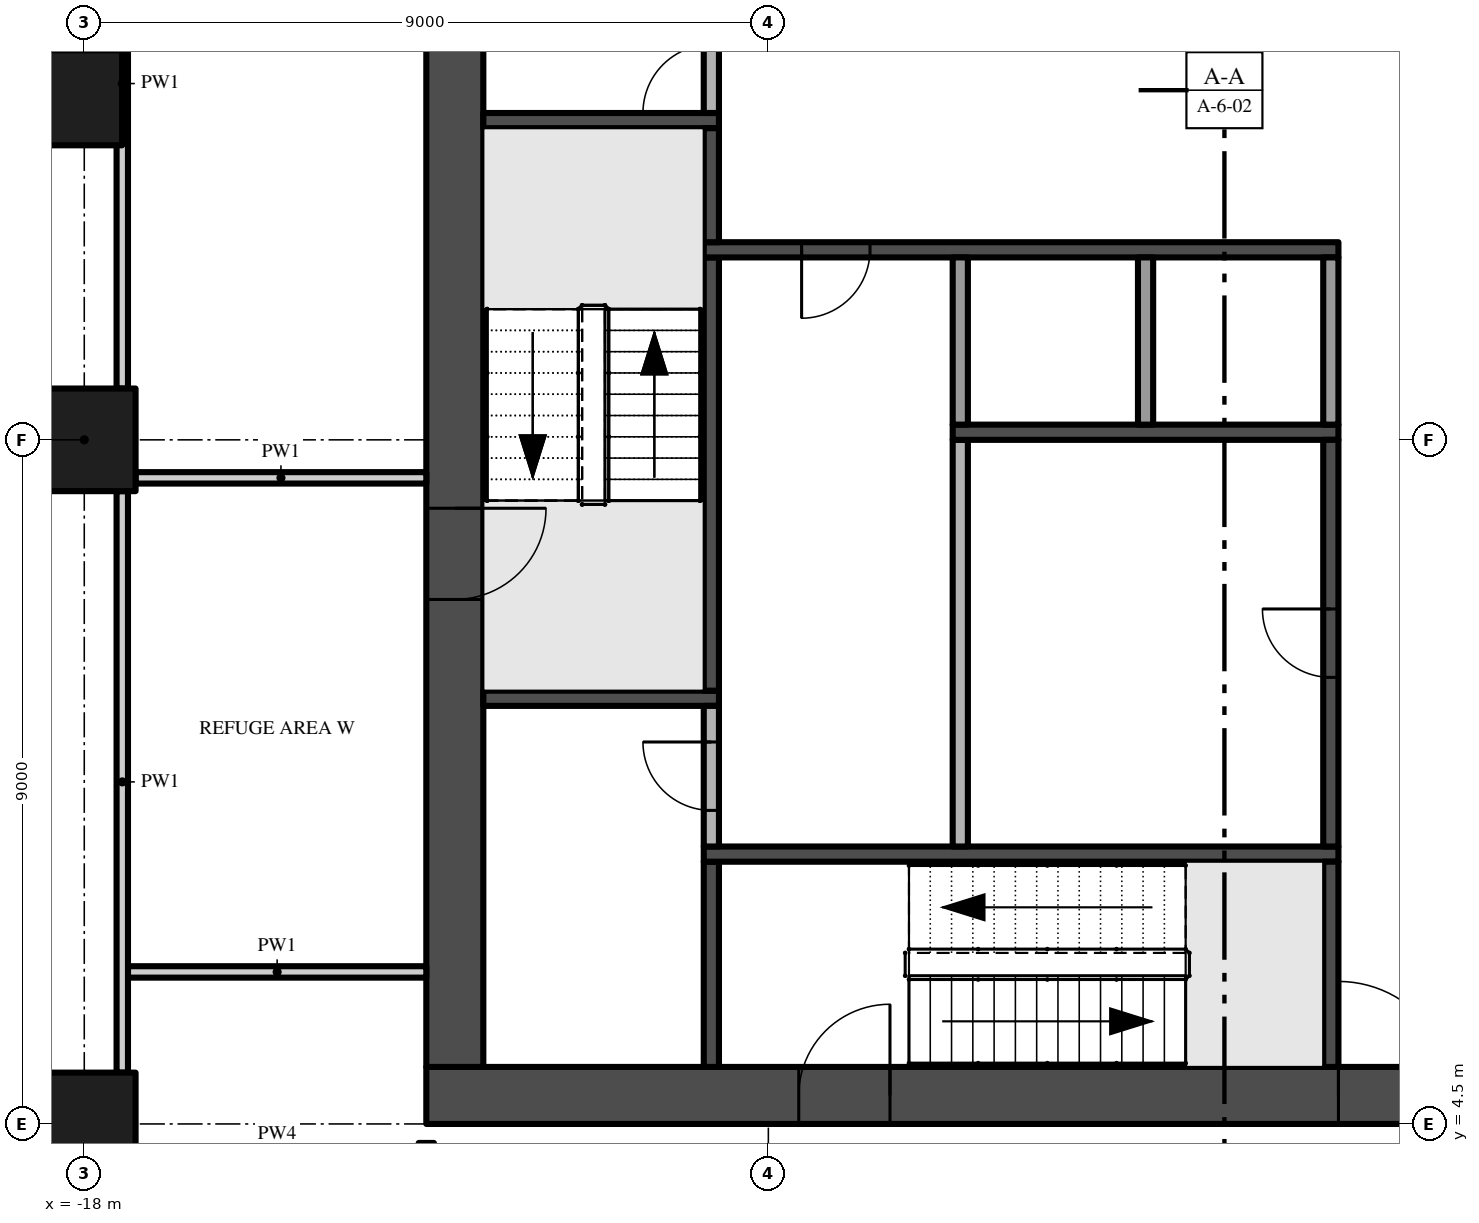
"""IFC4 building model, lengths in metres.
Left out: names, types, materials, properties, quantities, classifications, styles, units other than length and angle.
Written with IfcOpenShell. Run it as: python <this file> out.ifc"""

import sys

from ifc_helpers import new_model, si_unit, direction, frame, frame_2d, origin, origin_2d, place, context, subcontext, project, spatial, rectangle, extrude, element, fill, save


model = new_model("IFC4")
c1 = context("Model", 3, precision=1e-05, world=origin(), true_north=direction((0.0, 1.0)))
c2 = subcontext(c1, "Body", "Model", "MODEL_VIEW")
j1 = project(units=[si_unit("LENGTHUNIT", "METRE"), si_unit("PLANEANGLEUNIT", "RADIAN")], contexts=[c1])
p1 = place(None, origin())
s1 = spatial("IfcSite", under=j1, at=p1, CompositionType="ELEMENT")
p2 = place(p1, origin())
s2 = spatial("IfcBuilding", under=s1, at=p2, CompositionType="ELEMENT")
p3 = place(p2, frame((0.0, 0.0, 115.0)))
s3 = spatial("IfcBuildingStorey", under=s2, at=p3, CompositionType="ELEMENT", Elevation=115.0)
p4 = place(p3, frame((-13.5, 4.875, -0.3), z_axis=(0.0, 0.0, 1.0), x_axis=(1.0, 0.0, 0.0)))
e1 = element("IfcWall", 1, at=p4, inside=s3, PredefinedType="SHEAR", context=c2, shape_type="SweptSolid", body=[
    extrude(rectangle(XDim=27.0, YDim=0.75, at=frame_2d((13.5, 0.0))), origin(), (0.0, 0.0, 1.0), 5.0),
])
p5 = place(p4, frame((12.0, 0.0, 0.3)))
e2 = element("IfcOpeningElement", 2, at=p5, cuts=e1, PredefinedType="OPENING", context=c2, shape_type="SweptSolid", body=[
    extrude(rectangle(XDim=3.0, YDim=2.4, at=frame_2d((1.5, 1.2))), frame((0.0, 0.385, 0.0), z_axis=(0.0, -1.0, 0.0), x_axis=(1.0, 0.0, 0.0)), (0.0, 0.0, 1.0), 0.77),
])
p6 = place(p4, frame((4.9, 0.0, 0.3)))
e3 = element("IfcOpeningElement", 3, at=p6, cuts=e1, PredefinedType="OPENING", context=c2, shape_type="SweptSolid", body=[
    extrude(rectangle(XDim=1.2, YDim=2.2, at=frame_2d((0.6, 1.1))), frame((0.0, 0.385, 0.0), z_axis=(0.0, -1.0, 0.0), x_axis=(1.0, 0.0, 0.0)), (0.0, 0.0, 1.0), 0.77),
])
p7 = place(p4, frame((20.75, 0.0, 0.3)))
e4 = element("IfcOpeningElement", 4, at=p7, cuts=e1, PredefinedType="OPENING", context=c2, shape_type="SweptSolid", body=[
    extrude(rectangle(XDim=1.5, YDim=2.2, at=frame_2d((0.75, 1.1))), frame((0.0, 0.385, 0.0), z_axis=(0.0, -1.0, 0.0), x_axis=(1.0, 0.0, 0.0)), (0.0, 0.0, 1.0), 0.77),
])
p8 = place(p4, frame((17.4, 0.0, 0.3)))
e5 = element("IfcOpeningElement", 5, at=p8, cuts=e1, PredefinedType="OPENING", context=c2, shape_type="SweptSolid", body=[
    extrude(rectangle(XDim=1.2, YDim=2.2, at=frame_2d((0.6, 1.1))), frame((0.0, 0.385, 0.0), z_axis=(0.0, -1.0, 0.0), x_axis=(1.0, 0.0, 0.0)), (0.0, 0.0, 1.0), 0.77),
])
p9 = place(p3, frame((-13.125, 21.75, -0.3), z_axis=(0.0, 0.0, 1.0), x_axis=(0.0, -1.0, 0.0)))
e6 = element("IfcWall", 6, at=p9, inside=s3, PredefinedType="SHEAR", context=c2, shape_type="SweptSolid", body=[
    extrude(rectangle(XDim=16.5, YDim=0.75, at=frame_2d((8.25, 0.0))), origin(), (0.0, 0.0, 1.0), 5.0),
])
p10 = place(p9, frame((9.15, 0.0, 0.3)))
e7 = element("IfcOpeningElement", 7, at=p10, cuts=e6, PredefinedType="OPENING", context=c2, shape_type="SweptSolid", body=[
    extrude(rectangle(XDim=1.2, YDim=2.2, at=frame_2d((0.6, 1.1))), frame((0.0, 0.385, 0.0), z_axis=(0.0, -1.0, 0.0), x_axis=(1.0, 0.0, 0.0)), (0.0, 0.0, 1.0), 0.77),
])
for number, where, z_axis, x_axis in (
    (8, (-18.0, 13.5, 0.0), (0.0, 0.0, 1.0), (1.0, 0.0, 0.0)),
    (9, (-18.0, 4.5, 0.0), (0.0, 0.0, 1.0), (1.0, 0.0, 0.0)),
):
    element("IfcColumn", number, at=place(p3, frame(where, z_axis=z_axis, x_axis=x_axis)), inside=s3, PredefinedType="COLUMN", context=c2, shape_type="SweptSolid", body=[
        extrude(rectangle(XDim=1.35, YDim=1.35, at=origin_2d()), origin(), (0.0, 0.0, 1.0), 4.7),
    ])
p11 = place(p3, frame((-22.373, 18.0, 0.132), z_axis=(0.691571517203, 0.0, 0.722307992891), x_axis=(0.0, 1.0, 0.0)))
e10 = element("IfcColumn", 10, at=p11, inside=s3, PredefinedType="COLUMN", context=c2, shape_type="SweptSolid", body=[
    extrude(rectangle(XDim=1.25, YDim=1.25, at=origin_2d()), origin(), (0.0, 0.0, 1.0), 6.141),
])
for number, where, z_axis, x_axis in (
    (11, (-12.75, 10.1, 0.0), (0.0, 0.0, 1.0), (1.0, 0.0, 0.0)),
    (12, (-12.75, 17.7, 0.0), (0.0, 0.0, 1.0), (1.0, 0.0, 0.0)),
):
    element("IfcWall", number, at=place(p3, frame(where, z_axis=z_axis, x_axis=x_axis)), inside=s3, PredefinedType="SHEAR", context=c2, shape_type="SweptSolid", body=[
        extrude(rectangle(XDim=3.1, YDim=0.2, at=frame_2d((1.55, 0.0))), origin(), (0.0, 0.0, 1.0), 4.7),
    ])
p12 = place(p3, frame((-9.75, 5.25, 0.0), z_axis=(0.0, 0.0, 1.0), x_axis=(0.0, 1.0, 0.0)))
e13 = element("IfcWall", 13, at=p12, inside=s3, PredefinedType="SHEAR", context=c2, shape_type="SweptSolid", body=[
    extrude(rectangle(XDim=2.7, YDim=0.2, at=frame_2d((1.35, 0.0))), origin(), (0.0, 0.0, 1.0), 4.7),
])
p13 = place(p3, frame((-9.85, 8.05, 0.0), z_axis=(0.0, 0.0, 1.0), x_axis=(1.0, 0.0, 0.0)))
e14 = element("IfcWall", 14, at=p13, inside=s3, PredefinedType="SHEAR", context=c2, shape_type="SweptSolid", body=[
    extrude(rectangle(XDim=8.35, YDim=0.2, at=frame_2d((4.175, 0.0))), origin(), (0.0, 0.0, 1.0), 4.7),
])
p14 = place(p3, frame((-9.75, 8.15, 0.0), z_axis=(0.0, 0.0, 1.0), x_axis=(0.0, 1.0, 0.0)))
e15 = element("IfcWall", 15, at=p14, inside=s3, PredefinedType="PARTITIONING", context=c2, shape_type="SweptSolid", body=[
    extrude(rectangle(XDim=1.85, YDim=0.2, at=frame_2d((0.925, 0.0))), origin(), (0.0, 0.0, 1.0), 4.7),
])
p15 = place(p14, frame((0.475, 0.0, 0.0)))
e16 = element("IfcOpeningElement", 16, at=p15, cuts=e15, PredefinedType="OPENING", context=c2, shape_type="SweptSolid", body=[
    extrude(rectangle(XDim=0.9, YDim=2.1, at=frame_2d((0.45, 1.05))), frame((0.0, 0.11, 0.0), z_axis=(0.0, -1.0, 0.0), x_axis=(1.0, 0.0, 0.0)), (0.0, 0.0, 1.0), 0.22),
])
p16 = place(p3, frame((-9.75, 10.2, 0.0), z_axis=(0.0, 0.0, 1.0), x_axis=(0.0, 1.0, 0.0)))
e17 = element("IfcWall", 17, at=p16, inside=s3, PredefinedType="SHEAR", context=c2, shape_type="SweptSolid", body=[
    extrude(rectangle(XDim=5.7, YDim=0.2, at=frame_2d((2.85, 0.0))), origin(), (0.0, 0.0, 1.0), 4.7),
])
p17 = place(p3, frame((-1.5, 16.0, 0.0), z_axis=(0.0, 0.0, 1.0), x_axis=(-1.0, 0.0, 0.0)))
e18 = element("IfcWall", 18, at=p17, inside=s3, PredefinedType="SHEAR", context=c2, shape_type="SweptSolid", body=[
    extrude(rectangle(XDim=8.35, YDim=0.2, at=frame_2d((4.175, 0.0))), origin(), (0.0, 0.0, 1.0), 4.7),
])
p18 = place(p17, frame((6.162, 0.0, 0.0)))
e19 = element("IfcOpeningElement", 19, at=p18, cuts=e18, PredefinedType="OPENING", context=c2, shape_type="SweptSolid", body=[
    extrude(rectangle(XDim=0.9, YDim=2.1, at=frame_2d((0.45, 1.05))), frame((0.0, 0.11, 0.0), z_axis=(0.0, -1.0, 0.0), x_axis=(1.0, 0.0, 0.0)), (0.0, 0.0, 1.0), 0.22),
])
p19 = place(p3, frame((-9.75, 16.1, 0.0), z_axis=(0.0, 0.0, 1.0), x_axis=(0.0, 1.0, 0.0)))
e20 = element("IfcWall", 20, at=p19, inside=s3, PredefinedType="SHEAR", context=c2, shape_type="SweptSolid", body=[
    extrude(rectangle(XDim=1.5, YDim=0.2, at=frame_2d((0.75, 0.0))), origin(), (0.0, 0.0, 1.0), 4.7),
])
p20 = place(p3, frame((-9.75, 17.8, 0.0), z_axis=(0.0, 0.0, 1.0), x_axis=(0.0, 1.0, 0.0)))
e21 = element("IfcWall", 21, at=p20, inside=s3, PredefinedType="PARTITIONING", context=c2, shape_type="SweptSolid", body=[
    extrude(rectangle(XDim=1.4, YDim=0.2, at=frame_2d((0.7, 0.0))), origin(), (0.0, 0.0, 1.0), 4.7),
])
p21 = place(p20, origin())
e22 = element("IfcOpeningElement", 22, at=p21, cuts=e21, PredefinedType="OPENING", context=c2, shape_type="SweptSolid", body=[
    extrude(rectangle(XDim=0.9, YDim=2.1, at=frame_2d((0.45, 1.05))), frame((0.0, 0.11, 0.0), z_axis=(0.0, -1.0, 0.0), x_axis=(1.0, 0.0, 0.0)), (0.0, 0.0, 1.0), 0.22),
])
p22 = place(p3, frame((-6.475, 8.15, 0.0), z_axis=(0.0, 0.0, 1.0), x_axis=(0.0, 1.0, 0.0)))
e23 = element("IfcWall", 23, at=p22, inside=s3, PredefinedType="PARTITIONING", context=c2, shape_type="SweptSolid", body=[
    extrude(rectangle(XDim=5.35, YDim=0.2, at=frame_2d((2.675, 0.0))), origin(), (0.0, 0.0, 1.0), 4.7),
])
p23 = place(p3, frame((-6.575, 13.6, 0.0), z_axis=(0.0, 0.0, 1.0), x_axis=(1.0, 0.0, 0.0)))
e24 = element("IfcWall", 24, at=p23, inside=s3, PredefinedType="SHEAR", context=c2, shape_type="SweptSolid", body=[
    extrude(rectangle(XDim=5.075, YDim=0.2, at=frame_2d((2.538, 0.0))), origin(), (0.0, 0.0, 1.0), 4.7),
])
for number, where, z_axis, x_axis in (
    (25, (-6.475, 13.7, 0.0), (0.0, 0.0, 1.0), (0.0, 1.0, 0.0)),
    (26, (-4.037, 13.7, 0.0), (0.0, 0.0, 1.0), (0.0, 1.0, 0.0)),
):
    element("IfcWall", number, at=place(p3, frame(where, z_axis=z_axis, x_axis=x_axis)), inside=s3, PredefinedType="PARTITIONING", context=c2, shape_type="SweptSolid", body=[
        extrude(rectangle(XDim=2.2, YDim=0.2, at=frame_2d((1.1, 0.0))), origin(), (0.0, 0.0, 1.0), 4.7),
    ])
p24 = place(p3, frame((-1.6, 5.25, 0.0), z_axis=(0.0, 0.0, 1.0), x_axis=(0.0, 1.0, 0.0)))
e27 = element("IfcWall", 27, at=p24, inside=s3, PredefinedType="SHEAR", context=c2, shape_type="SweptSolid", body=[
    extrude(rectangle(XDim=2.7, YDim=0.2, at=frame_2d((1.35, 0.0))), origin(), (0.0, 0.0, 1.0), 4.7),
])
p25 = place(p3, frame((-1.6, 8.15, 0.0), z_axis=(0.0, 0.0, 1.0), x_axis=(0.0, 1.0, 0.0)))
e28 = element("IfcWall", 28, at=p25, inside=s3, PredefinedType="SHEAR", context=c2, shape_type="SweptSolid", body=[
    extrude(rectangle(XDim=5.35, YDim=0.2, at=frame_2d((2.675, 0.0))), origin(), (0.0, 0.0, 1.0), 4.7),
])
p26 = place(p25, frame((2.225, 0.0, 0.0)))
e29 = element("IfcOpeningElement", 29, at=p26, cuts=e28, PredefinedType="OPENING", context=c2, shape_type="SweptSolid", body=[
    extrude(rectangle(XDim=0.9, YDim=2.1, at=frame_2d((0.45, 1.05))), frame((0.0, 0.11, 0.0), z_axis=(0.0, -1.0, 0.0), x_axis=(1.0, 0.0, 0.0)), (0.0, 0.0, 1.0), 0.22),
])
p27 = place(p3, frame((-1.6, 13.7, 0.0), z_axis=(0.0, 0.0, 1.0), x_axis=(0.0, 1.0, 0.0)))
e30 = element("IfcWall", 30, at=p27, inside=s3, PredefinedType="PARTITIONING", context=c2, shape_type="SweptSolid", body=[
    extrude(rectangle(XDim=2.2, YDim=0.2, at=frame_2d((1.1, 0.0))), origin(), (0.0, 0.0, 1.0), 4.7),
])
p28 = place(p3, frame((-17.425, 6.5, 0.0), z_axis=(0.0, 0.0, 1.0), x_axis=(1.0, 0.0, 0.0)))
e31 = element("IfcWall", 31, at=p28, inside=s3, PredefinedType="PARTITIONING", context=c2, shape_type="SweptSolid", body=[
    extrude(rectangle(XDim=3.925, YDim=0.15, at=frame_2d((1.962, 0.0))), origin(), (0.0, 0.0, 1.0), 4.7),
])
p29 = place(p3, frame((-17.325, 13.0, 0.0), z_axis=(0.0, 0.0, 1.0), x_axis=(1.0, 0.0, 0.0)))
e32 = element("IfcWall", 32, at=p29, inside=s3, PredefinedType="PARTITIONING", context=c2, shape_type="SweptSolid", body=[
    extrude(rectangle(XDim=3.825, YDim=0.15, at=frame_2d((1.913, 0.0))), origin(), (0.0, 0.0, 1.0), 4.7),
])
p30 = place(p3, frame((-17.5, 5.175, 0.0), z_axis=(0.0, 0.0, 1.0), x_axis=(0.0, 1.0, 0.0)))
e33 = element("IfcWall", 33, at=p30, inside=s3, PredefinedType="PARTITIONING", context=c2, shape_type="SweptSolid", body=[
    extrude(rectangle(XDim=7.65, YDim=0.15, at=frame_2d((3.825, 0.0))), origin(), (0.0, 0.0, 1.0), 4.7),
])
p31 = place(p3, frame((-17.5, 14.175, 0.0), z_axis=(0.0, 0.0, 1.0), x_axis=(0.0, 1.0, 0.0)))
e34 = element("IfcWall", 34, at=p31, inside=s3, PredefinedType="PARTITIONING", context=c2, shape_type="SweptSolid", body=[
    extrude(rectangle(XDim=8.025, YDim=0.15, at=frame_2d((4.013, 0.0))), origin(), (0.0, 0.0, 1.0), 4.7),
])
p32 = place(p5, frame((3.0, 0.0, 0.0), z_axis=(0.0, 0.0, 1.0), x_axis=(-1.0, 0.0, 0.0)))
e35 = element("IfcDoor", 35, at=p32, inside=s3, OperationType="DOUBLE_DOOR_SINGLE_SWING", PredefinedType="DOOR", context=c2, shape_type="SweptSolid", body=[
    extrude(rectangle(XDim=3.0, YDim=2.4, at=frame_2d((1.5, 1.2))), frame((0.0, 0.025, 0.0), z_axis=(0.0, -1.0, 0.0), x_axis=(1.0, 0.0, 0.0)), (0.0, 0.0, 1.0), 0.05),
])
fill(e2, e35)
p33 = place(p10, frame((1.2, 0.0, 0.0), z_axis=(0.0, 0.0, 1.0), x_axis=(-1.0, 0.0, 0.0)))
e36 = element("IfcDoor", 36, at=p33, inside=s3, OperationType="SINGLE_SWING_RIGHT", PredefinedType="DOOR", context=c2, shape_type="SweptSolid", body=[
    extrude(rectangle(XDim=1.2, YDim=2.2, at=frame_2d((0.6, 1.1))), frame((0.0, 0.025, 0.0), z_axis=(0.0, -1.0, 0.0), x_axis=(1.0, 0.0, 0.0)), (0.0, 0.0, 1.0), 0.05),
])
fill(e7, e36)
p34 = place(p6, frame((1.2, 0.0, 0.0), z_axis=(0.0, 0.0, 1.0), x_axis=(-1.0, 0.0, 0.0)))
e37 = element("IfcDoor", 37, at=p34, inside=s3, OperationType="SINGLE_SWING_LEFT", PredefinedType="DOOR", context=c2, shape_type="SweptSolid", body=[
    extrude(rectangle(XDim=1.2, YDim=2.2, at=frame_2d((0.6, 1.1))), frame((0.0, 0.025, 0.0), z_axis=(0.0, -1.0, 0.0), x_axis=(1.0, 0.0, 0.0)), (0.0, 0.0, 1.0), 0.05),
])
fill(e3, e37)
p35 = place(p18, origin())
e38 = element("IfcDoor", 38, at=p35, inside=s3, OperationType="SINGLE_SWING_RIGHT", PredefinedType="DOOR", context=c2, shape_type="SweptSolid", body=[
    extrude(rectangle(XDim=0.9, YDim=2.1, at=frame_2d((0.45, 1.05))), frame((0.0, 0.025, 0.0), z_axis=(0.0, -1.0, 0.0), x_axis=(1.0, 0.0, 0.0)), (0.0, 0.0, 1.0), 0.05),
])
fill(e19, e38)
p36 = place(p26, origin())
e39 = element("IfcDoor", 39, at=p36, inside=s3, OperationType="SINGLE_SWING_RIGHT", PredefinedType="DOOR", context=c2, shape_type="SweptSolid", body=[
    extrude(rectangle(XDim=0.9, YDim=2.1, at=frame_2d((0.45, 1.05))), frame((0.0, 0.025, 0.0), z_axis=(0.0, -1.0, 0.0), x_axis=(1.0, 0.0, 0.0)), (0.0, 0.0, 1.0), 0.05),
])
fill(e29, e39)
p37 = place(p21, origin())
e40 = element("IfcDoor", 40, at=p37, inside=s3, OperationType="SINGLE_SWING_LEFT", PredefinedType="DOOR", context=c2, shape_type="SweptSolid", body=[
    extrude(rectangle(XDim=0.9, YDim=2.1, at=frame_2d((0.45, 1.05))), frame((0.0, 0.025, 0.0), z_axis=(0.0, -1.0, 0.0), x_axis=(1.0, 0.0, 0.0)), (0.0, 0.0, 1.0), 0.05),
])
fill(e22, e40)
p38 = place(p15, origin())
e41 = element("IfcDoor", 41, at=p38, inside=s3, OperationType="SINGLE_SWING_RIGHT", PredefinedType="DOOR", context=c2, shape_type="SweptSolid", body=[
    extrude(rectangle(XDim=0.9, YDim=2.1, at=frame_2d((0.45, 1.05))), frame((0.0, 0.025, 0.0), z_axis=(0.0, -1.0, 0.0), x_axis=(1.0, 0.0, 0.0)), (0.0, 0.0, 1.0), 0.05),
])
fill(e16, e41)
save(model, sys.argv[1])
